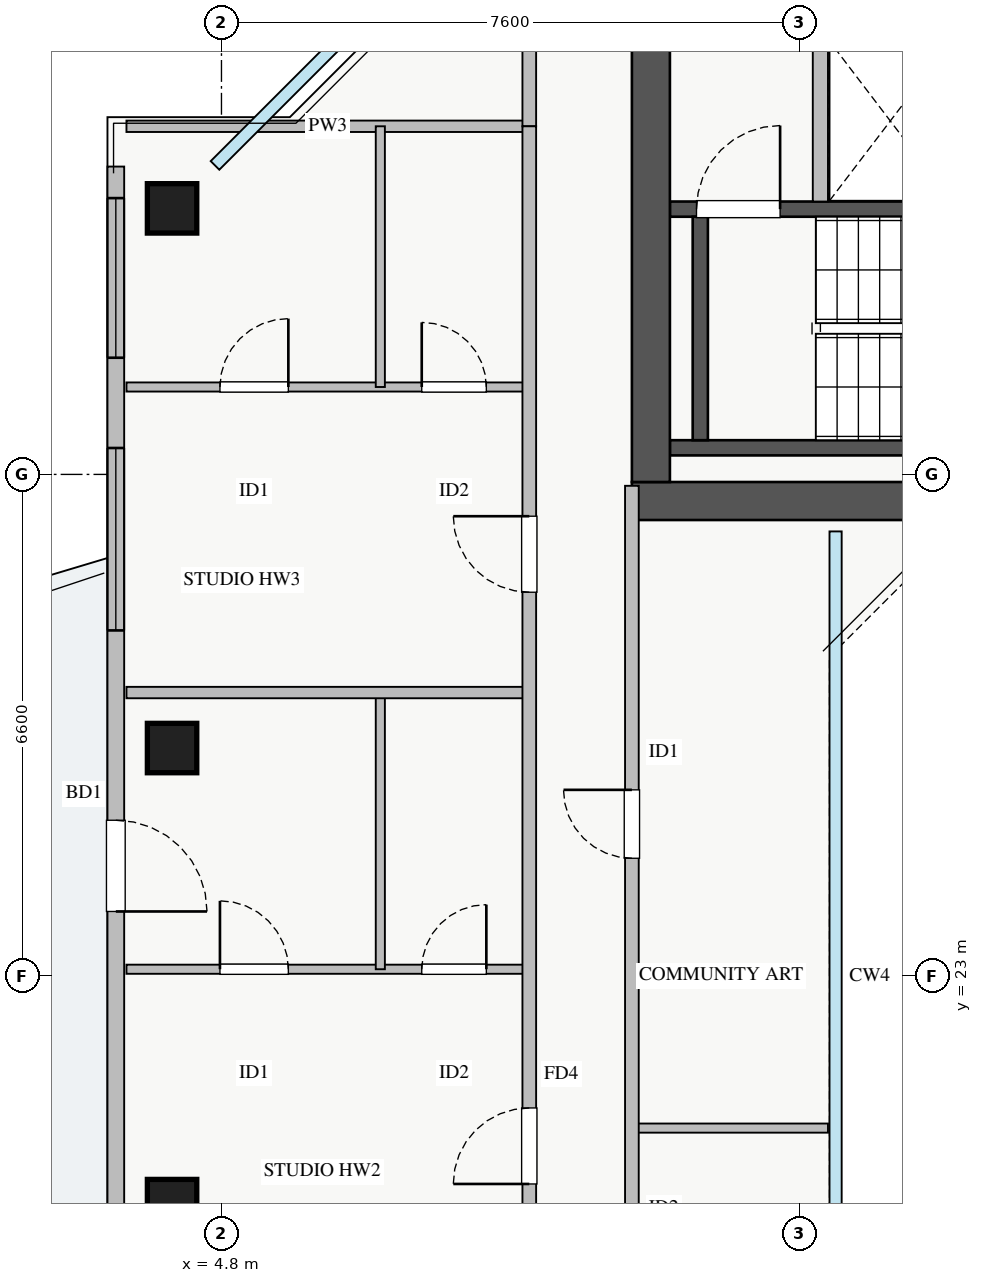
"""IFC4 building model, lengths in metres.
Left out: names, types, materials, properties, quantities, classifications, styles, units other than length and angle.
Written with IfcOpenShell. Run it as: python <this file> out.ifc"""

import sys

from ifc_helpers import new_model, si_unit, direction, frame, frame_2d, origin, origin_2d, place, context, subcontext, project, spatial, rectangle, extrude, source, transform, mapped, element, fill, save


model = new_model("IFC4")
c1 = context("Model", 3, precision=1e-05, world=origin(), true_north=direction((0.0, 1.0)))
c2 = subcontext(c1, "Body", "Model", "MODEL_VIEW")
j1 = project(units=[si_unit("LENGTHUNIT", "METRE"), si_unit("PLANEANGLEUNIT", "RADIAN")], contexts=[c1])
p1 = place(None, origin())
s1 = spatial("IfcSite", under=j1, at=p1, CompositionType="ELEMENT")
p2 = place(p1, origin())
s2 = spatial("IfcBuilding", under=s1, at=p2, CompositionType="ELEMENT")
p3 = place(p2, frame((0.0, 0.0, 260.0)))
s3 = spatial("IfcBuildingStorey", under=s2, at=p3, CompositionType="ELEMENT", Elevation=260.0)
p4 = place(p3, frame((12.68, 33.2, 0.0), z_axis=(0.0, 0.0, 1.0), x_axis=(1.0, 0.0, 0.0)))
e1 = element("IfcWall", 1, at=p4, inside=s3, PredefinedType="SHEAR", context=c2, shape_type="SweptSolid", body=[
    extrude(rectangle(XDim=1.94, YDim=0.18, at=frame_2d((0.97, 0.0))), origin(), (0.0, 0.0, 1.0), 3.03),
])
p5 = place(p3, frame((10.7, 29.95, 0.0), z_axis=(0.0, 0.0, 1.0), x_axis=(1.0, 0.0, 0.0)))
e2 = element("IfcWall", 2, at=p5, inside=s3, PredefinedType="SHEAR", context=c2, shape_type="SweptSolid", body=[
    extrude(rectangle(XDim=7.45, YDim=0.2, at=frame_2d((3.725, 0.0))), origin(), (0.0, 0.0, 1.0), 3.25),
])
p6 = place(p3, frame((10.7, 33.09, 0.0), z_axis=(0.0, 0.0, 1.0), x_axis=(1.0, 0.0, 0.0)))
e3 = element("IfcWall", 3, at=p6, inside=s3, PredefinedType="SHEAR", context=c2, shape_type="SweptSolid", body=[
    extrude(rectangle(XDim=7.45, YDim=0.2, at=frame_2d((3.725, 0.0))), origin(), (0.0, 0.0, 1.0), 3.25),
])
p7 = place(p6, frame((0.35, 0.0, 0.0)))
e4 = element("IfcOpeningElement", 4, at=p7, cuts=e3, PredefinedType="OPENING", context=c2, shape_type="SweptSolid", body=[
    extrude(rectangle(XDim=1.1, YDim=2.05, at=frame_2d((0.55, 1.025))), frame((0.0, 0.11, 0.0), z_axis=(0.0, -1.0, 0.0), x_axis=(1.0, 0.0, 0.0)), (0.0, 0.0, 1.0), 0.22),
])
p8 = place(p3, frame((11.1, 30.05, 0.0), z_axis=(0.0, 0.0, 1.0), x_axis=(0.0, 1.0, 0.0)))
e5 = element("IfcWall", 5, at=p8, inside=s3, PredefinedType="SHEAR", context=c2, shape_type="SweptSolid", body=[
    extrude(rectangle(XDim=2.94, YDim=0.2, at=frame_2d((1.47, 0.0))), origin(), (0.0, 0.0, 1.0), 3.25),
])
p9 = place(p3, frame((10.2, 29.25, 0.0), z_axis=(0.0, 0.0, 1.0), x_axis=(1.0, 0.0, 0.0)))
e6 = element("IfcWall", 6, at=p9, inside=s3, PredefinedType="SHEAR", context=c2, shape_type="SweptSolid", body=[
    extrude(rectangle(XDim=17.6, YDim=0.5, at=frame_2d((8.8, 0.0))), origin(), (0.0, 0.0, 1.0), 3.25),
])
p10 = place(p3, frame((10.45, 29.5, 0.0), z_axis=(0.0, 0.0, 1.0), x_axis=(0.0, 1.0, 0.0)))
e7 = element("IfcWall", 7, at=p10, inside=s3, PredefinedType="SHEAR", context=c2, shape_type="SweptSolid", body=[
    extrude(rectangle(XDim=6.2, YDim=0.5, at=frame_2d((3.1, 0.0))), origin(), (0.0, 0.0, 1.0), 3.25),
])
m1 = source(origin(), c2, "Body", "SweptSolid", [
    extrude(rectangle(XDim=0.65, YDim=0.65, at=origin_2d()), origin(), (0.0, 0.0, 1.0), 3.25),
])
for number, where, z_axis, x_axis in (
    (8, (4.15, 33.1, 0.0), (0.0, 0.0, 1.0), (1.0, 0.0, 0.0)),
    (9, (4.15, 26.0, 0.0), (0.0, 0.0, 1.0), (1.0, 0.0, 0.0)),
    (10, (4.15, 20.0, 0.0), (0.0, 0.0, 1.0), (1.0, 0.0, 0.0)),
):
    element("IfcColumn", number, at=place(p3, frame(where, z_axis=z_axis, x_axis=x_axis)), inside=s3, PredefinedType="COLUMN", context=c2, shape_type="MappedRepresentation", body=[
        mapped(m1, transform((0.0, 0.0, 0.0), x_axis=(1.0, 0.0, 0.0), y_axis=(0.0, 1.0, 0.0), z_axis=(0.0, 0.0, 1.0), scale=1.0)),
    ])
p11 = place(p3, frame((3.41, 12.35, 0.0), z_axis=(0.0, 0.0, 1.0), x_axis=(0.0, 1.0, 0.0)))
e11 = element("IfcWall", 11, at=p11, inside=s3, PredefinedType="STANDARD", context=c2, shape_type="SweptSolid", body=[
    extrude(rectangle(XDim=21.3, YDim=0.22, at=frame_2d((10.65, 0.0))), origin(), (0.0, 0.0, 1.0), 2.57),
])
p12 = place(p11, frame((11.5, 0.0, 0.0)))
e12 = element("IfcOpeningElement", 12, at=p12, cuts=e11, PredefinedType="OPENING", context=c2, shape_type="SweptSolid", body=[
    extrude(rectangle(XDim=1.2, YDim=2.1, at=frame_2d((0.6, 1.05))), frame((0.0, 0.12, 0.0), z_axis=(0.0, -1.0, 0.0), x_axis=(1.0, 0.0, 0.0)), (0.0, 0.0, 1.0), 0.24),
])
p13 = place(p11, frame((0.44, 0.0, 0.9)))
e13 = element("IfcOpeningElement", 13, at=p13, cuts=e11, PredefinedType="OPENING", context=c2, shape_type="SweptSolid", body=[
    extrude(rectangle(XDim=2.4, YDim=1.5, at=frame_2d((1.2, 0.75))), frame((0.0, 0.12, 0.0), z_axis=(0.0, -1.0, 0.0), x_axis=(1.0, 0.0, 0.0)), (0.0, 0.0, 1.0), 0.24),
])
p14 = place(p11, frame((18.785, 0.0, 0.9)))
e14 = element("IfcOpeningElement", 14, at=p14, cuts=e11, PredefinedType="OPENING", context=c2, shape_type="SweptSolid", body=[
    extrude(rectangle(XDim=2.1, YDim=1.5, at=frame_2d((1.05, 0.75))), frame((0.0, 0.12, 0.0), z_axis=(0.0, -1.0, 0.0), x_axis=(1.0, 0.0, 0.0)), (0.0, 0.0, 1.0), 0.24),
])
p15 = place(p11, frame((3.653, 0.0, 0.9)))
e15 = element("IfcOpeningElement", 15, at=p15, cuts=e11, PredefinedType="OPENING", context=c2, shape_type="SweptSolid", body=[
    extrude(rectangle(XDim=2.4, YDim=1.5, at=frame_2d((1.2, 0.75))), frame((0.0, 0.12, 0.0), z_axis=(0.0, -1.0, 0.0), x_axis=(1.0, 0.0, 0.0)), (0.0, 0.0, 1.0), 0.24),
])
p16 = place(p11, frame((15.198, 0.0, 0.9)))
e16 = element("IfcOpeningElement", 16, at=p16, cuts=e11, PredefinedType="OPENING", context=c2, shape_type="SweptSolid", body=[
    extrude(rectangle(XDim=2.4, YDim=1.5, at=frame_2d((1.2, 0.75))), frame((0.0, 0.12, 0.0), z_axis=(0.0, -1.0, 0.0), x_axis=(1.0, 0.0, 0.0)), (0.0, 0.0, 1.0), 0.24),
])
p17 = place(p11, frame((6.705, 0.0, 0.9)))
e17 = element("IfcOpeningElement", 17, at=p17, cuts=e11, PredefinedType="OPENING", context=c2, shape_type="SweptSolid", body=[
    extrude(rectangle(XDim=0.9, YDim=1.2, at=frame_2d((0.45, 0.6))), frame((0.0, 0.12, 0.0), z_axis=(0.0, -1.0, 0.0), x_axis=(1.0, 0.0, 0.0)), (0.0, 0.0, 1.0), 0.24),
])
p18 = place(p3, frame((12.68, 33.19, 0.0), z_axis=(0.0, 0.0, 1.0), x_axis=(0.0, 1.0, 0.0)))
e18 = element("IfcWall", 18, at=p18, inside=s3, PredefinedType="PARTITIONING", context=c2, shape_type="SweptSolid", body=[
    extrude(rectangle(XDim=2.21, YDim=0.2, at=frame_2d((1.105, 0.0))), origin(), (0.0, 0.0, 1.0), 3.03),
])
p19 = place(p3, frame((3.55, 34.18, 0.0), z_axis=(0.0, 0.0, 1.0), x_axis=(1.0, 0.0, 0.0)))
e19 = element("IfcWall", 19, at=p19, inside=s3, PredefinedType="PARTITIONING", context=c2, shape_type="SweptSolid", body=[
    extrude(rectangle(XDim=5.3, YDim=0.15, at=frame_2d((2.65, 0.0))), origin(), (0.0, 0.0, 1.0), 3.03),
])
p20 = place(p3, frame((8.85, 34.18, 0.0), z_axis=(0.0, 0.0, 1.0), x_axis=(0.0, 1.0, 0.0)))
e20 = element("IfcWall", 20, at=p20, inside=s3, PredefinedType="PARTITIONING", context=c2, shape_type="SweptSolid", body=[
    extrude(rectangle(XDim=3.26, YDim=0.18, at=frame_2d((1.63, 0.0))), origin(), (0.0, 0.0, 1.0), 2.529),
])
p21 = place(p3, frame((3.55, 23.09, 0.0), z_axis=(0.0, 0.0, 1.0), x_axis=(1.0, 0.0, 0.0)))
e21 = element("IfcWall", 21, at=p21, inside=s3, PredefinedType="PLUMBINGWALL", context=c2, shape_type="SweptSolid", body=[
    extrude(rectangle(XDim=5.3, YDim=0.12, at=frame_2d((2.65, 0.0))), origin(), (0.0, 0.0, 1.0), 3.03),
])
p22 = place(p21, frame((1.23, 0.0, 0.0)))
e22 = element("IfcOpeningElement", 22, at=p22, cuts=e21, PredefinedType="OPENING", context=c2, shape_type="SweptSolid", body=[
    extrude(rectangle(XDim=0.9, YDim=2.05, at=frame_2d((0.45, 1.025))), frame((0.0, 0.07, 0.0), z_axis=(0.0, -1.0, 0.0), x_axis=(1.0, 0.0, 0.0)), (0.0, 0.0, 1.0), 0.14),
])
p23 = place(p21, frame((3.885, 0.0, 0.0)))
e23 = element("IfcOpeningElement", 23, at=p23, cuts=e21, PredefinedType="OPENING", context=c2, shape_type="SweptSolid", body=[
    extrude(rectangle(XDim=0.85, YDim=2.05, at=frame_2d((0.425, 1.025))), frame((0.0, 0.07, 0.0), z_axis=(0.0, -1.0, 0.0), x_axis=(1.0, 0.0, 0.0)), (0.0, 0.0, 1.0), 0.14),
])
p24 = place(p3, frame((6.89, 23.09, 0.0), z_axis=(0.0, 0.0, 1.0), x_axis=(0.0, 1.0, 0.0)))
e24 = element("IfcWall", 24, at=p24, inside=s3, PredefinedType="PLUMBINGWALL", context=c2, shape_type="SweptSolid", body=[
    extrude(rectangle(XDim=3.64, YDim=0.12, at=frame_2d((1.82, 0.0))), origin(), (0.0, 0.0, 1.0), 3.03),
])
p25 = place(p3, frame((3.55, 30.75, 0.0), z_axis=(0.0, 0.0, 1.0), x_axis=(1.0, 0.0, 0.0)))
e25 = element("IfcWall", 25, at=p25, inside=s3, PredefinedType="PLUMBINGWALL", context=c2, shape_type="SweptSolid", body=[
    extrude(rectangle(XDim=5.3, YDim=0.12, at=frame_2d((2.65, 0.0))), origin(), (0.0, 0.0, 1.0), 3.03),
])
p26 = place(p25, frame((1.23, 0.0, 0.0)))
e26 = element("IfcOpeningElement", 26, at=p26, cuts=e25, PredefinedType="OPENING", context=c2, shape_type="SweptSolid", body=[
    extrude(rectangle(XDim=0.9, YDim=2.05, at=frame_2d((0.45, 1.025))), frame((0.0, 0.07, 0.0), z_axis=(0.0, -1.0, 0.0), x_axis=(1.0, 0.0, 0.0)), (0.0, 0.0, 1.0), 0.14),
])
p27 = place(p25, frame((3.885, 0.0, 0.0)))
e27 = element("IfcOpeningElement", 27, at=p27, cuts=e25, PredefinedType="OPENING", context=c2, shape_type="SweptSolid", body=[
    extrude(rectangle(XDim=0.85, YDim=2.05, at=frame_2d((0.425, 1.025))), frame((0.0, 0.07, 0.0), z_axis=(0.0, -1.0, 0.0), x_axis=(1.0, 0.0, 0.0)), (0.0, 0.0, 1.0), 0.14),
])
p28 = place(p3, frame((6.89, 30.75, 0.0), z_axis=(0.0, 0.0, 1.0), x_axis=(0.0, 1.0, 0.0)))
e28 = element("IfcWall", 28, at=p28, inside=s3, PredefinedType="PLUMBINGWALL", context=c2, shape_type="SweptSolid", body=[
    extrude(rectangle(XDim=3.43, YDim=0.12, at=frame_2d((1.715, 0.0))), origin(), (0.0, 0.0, 1.0), 3.03),
])
p29 = place(p3, frame((3.55, 26.73, 0.0), z_axis=(0.0, 0.0, 1.0), x_axis=(1.0, 0.0, 0.0)))
e29 = element("IfcWall", 29, at=p29, inside=s3, PredefinedType="PARTITIONING", context=c2, shape_type="SweptSolid", body=[
    extrude(rectangle(XDim=5.3, YDim=0.15, at=frame_2d((2.65, 0.0))), origin(), (0.0, 0.0, 1.0), 3.03),
])
p30 = place(p3, frame((8.85, 11.82, 0.0), z_axis=(0.0, 0.0, 1.0), x_axis=(0.0, 1.0, 0.0)))
e30 = element("IfcWall", 30, at=p30, inside=s3, PredefinedType="PARTITIONING", context=c2, shape_type="SweptSolid", body=[
    extrude(rectangle(XDim=22.36, YDim=0.18, at=frame_2d((11.18, 0.0))), origin(), (0.0, 0.0, 1.0), 2.529),
])
p31 = place(p30, frame((1.2, 0.0, 0.0)))
e31 = element("IfcOpeningElement", 31, at=p31, cuts=e30, PredefinedType="OPENING", context=c2, shape_type="SweptSolid", body=[
    extrude(rectangle(XDim=1.0, YDim=2.05, at=frame_2d((0.5, 1.025))), frame((0.0, 0.1, 0.0), z_axis=(0.0, -1.0, 0.0), x_axis=(1.0, 0.0, 0.0)), (0.0, 0.0, 1.0), 0.2),
])
p32 = place(p30, frame((8.445, 0.0, 0.0)))
e32 = element("IfcOpeningElement", 32, at=p32, cuts=e30, PredefinedType="OPENING", context=c2, shape_type="SweptSolid", body=[
    extrude(rectangle(XDim=1.0, YDim=2.05, at=frame_2d((0.5, 1.025))), frame((0.0, 0.1, 0.0), z_axis=(0.0, -1.0, 0.0), x_axis=(1.0, 0.0, 0.0)), (0.0, 0.0, 1.0), 0.2),
])
p33 = place(p30, frame((16.23, 0.0, 0.0)))
e33 = element("IfcOpeningElement", 33, at=p33, cuts=e30, PredefinedType="OPENING", context=c2, shape_type="SweptSolid", body=[
    extrude(rectangle(XDim=1.0, YDim=2.05, at=frame_2d((0.5, 1.025))), frame((0.0, 0.1, 0.0), z_axis=(0.0, -1.0, 0.0), x_axis=(1.0, 0.0, 0.0)), (0.0, 0.0, 1.0), 0.2),
])
p34 = place(p3, frame((10.2, 21.0, 0.0), z_axis=(0.0, 0.0, 1.0), x_axis=(1.0, 0.0, 0.0)))
e34 = element("IfcWall", 34, at=p34, inside=s3, PredefinedType="PLUMBINGWALL", context=c2, shape_type="SweptSolid", body=[
    extrude(rectangle(XDim=2.58, YDim=0.12, at=frame_2d((1.29, 0.0))), origin(), (0.0, 0.0, 1.0), 3.03),
])
p35 = place(p3, frame((10.2, 16.55, 0.0), z_axis=(0.0, 0.0, 1.0), x_axis=(0.0, 1.0, 0.0)))
e35 = element("IfcWall", 35, at=p35, inside=s3, PredefinedType="PARTITIONING", context=c2, shape_type="SweptSolid", body=[
    extrude(rectangle(XDim=12.9, YDim=0.18, at=frame_2d((6.45, 0.0))), origin(), (0.0, 0.0, 1.0), 3.03),
])
p36 = place(p35, frame((2.025, 0.0, 0.0)))
e36 = element("IfcOpeningElement", 36, at=p36, cuts=e35, PredefinedType="OPENING", context=c2, shape_type="SweptSolid", body=[
    extrude(rectangle(XDim=0.85, YDim=2.05, at=frame_2d((0.425, 1.025))), frame((0.0, 0.1, 0.0), z_axis=(0.0, -1.0, 0.0), x_axis=(1.0, 0.0, 0.0)), (0.0, 0.0, 1.0), 0.2),
])
p37 = place(p35, frame((8.0, 0.0, 0.0)))
e37 = element("IfcOpeningElement", 37, at=p37, cuts=e35, PredefinedType="OPENING", context=c2, shape_type="SweptSolid", body=[
    extrude(rectangle(XDim=0.9, YDim=2.05, at=frame_2d((0.45, 1.025))), frame((0.0, 0.1, 0.0), z_axis=(0.0, -1.0, 0.0), x_axis=(1.0, 0.0, 0.0)), (0.0, 0.0, 1.0), 0.2),
])
m2 = source(origin(), c2, "Body", "SweptSolid", [
    extrude(rectangle(XDim=1.2, YDim=2.1, at=frame_2d((0.6, 1.05))), frame((0.0, 0.025, 0.0), z_axis=(0.0, -1.0, 0.0), x_axis=(1.0, 0.0, 0.0)), (0.0, 0.0, 1.0), 0.05),
])
p38 = place(p12, frame((1.2, 0.0, 0.0), z_axis=(0.0, 0.0, 1.0), x_axis=(-1.0, 0.0, 0.0)))
e38 = element("IfcDoor", 38, at=p38, inside=s3, OperationType="SINGLE_SWING_LEFT", PredefinedType="DOOR", context=c2, shape_type="MappedRepresentation", body=[
    mapped(m2, transform((0.0, 0.0, 0.0), x_axis=(1.0, 0.0, 0.0), y_axis=(0.0, 1.0, 0.0), z_axis=(0.0, 0.0, 1.0), scale=1.0)),
])
fill(e12, e38)
m3 = source(origin(), c2, "Body", "SweptSolid", [
    extrude(rectangle(XDim=2.1, YDim=1.5, at=frame_2d((1.05, 0.75))), frame((0.0, 0.03, 0.0), z_axis=(0.0, -1.0, 0.0), x_axis=(1.0, 0.0, 0.0)), (0.0, 0.0, 1.0), 0.06),
])
p39 = place(p14, origin())
e39 = element("IfcWindow", 39, at=p39, inside=s3, PartitioningType="TRIPLE_PANEL_VERTICAL", PredefinedType="WINDOW", context=c2, shape_type="MappedRepresentation", body=[
    mapped(m3, transform((0.0, 0.0, 0.0), x_axis=(1.0, 0.0, 0.0), y_axis=(0.0, 1.0, 0.0), z_axis=(0.0, 0.0, 1.0), scale=1.0)),
])
fill(e14, e39)
m4 = source(origin(), c2, "Body", "SweptSolid", [
    extrude(rectangle(XDim=1.1, YDim=2.05, at=frame_2d((0.55, 1.025))), frame((0.0, 0.025, 0.0), z_axis=(0.0, -1.0, 0.0), x_axis=(1.0, 0.0, 0.0)), (0.0, 0.0, 1.0), 0.05),
])
p40 = place(p7, origin())
e40 = element("IfcDoor", 40, at=p40, inside=s3, OperationType="SINGLE_SWING_RIGHT", PredefinedType="DOOR", context=c2, shape_type="MappedRepresentation", body=[
    mapped(m4, transform((0.0, 0.0, 0.0), x_axis=(1.0, 0.0, 0.0), y_axis=(0.0, 1.0, 0.0), z_axis=(0.0, 0.0, 1.0), scale=1.0)),
])
fill(e4, e40)
m5 = source(origin(), c2, "Body", "SweptSolid", [
    extrude(rectangle(XDim=0.9, YDim=2.05, at=frame_2d((0.45, 1.025))), frame((0.0, 0.025, 0.0), z_axis=(0.0, -1.0, 0.0), x_axis=(1.0, 0.0, 0.0)), (0.0, 0.0, 1.0), 0.05),
])
p41 = place(p22, origin())
e41 = element("IfcDoor", 41, at=p41, inside=s3, OperationType="SINGLE_SWING_LEFT", PredefinedType="DOOR", context=c2, shape_type="MappedRepresentation", body=[
    mapped(m5, transform((0.0, 0.0, 0.0), x_axis=(1.0, 0.0, 0.0), y_axis=(0.0, 1.0, 0.0), z_axis=(0.0, 0.0, 1.0), scale=1.0)),
])
fill(e22, e41)
m6 = source(origin(), c2, "Body", "SweptSolid", [
    extrude(rectangle(XDim=0.85, YDim=2.05, at=frame_2d((0.425, 1.025))), frame((0.0, 0.025, 0.0), z_axis=(0.0, -1.0, 0.0), x_axis=(1.0, 0.0, 0.0)), (0.0, 0.0, 1.0), 0.05),
])
p42 = place(p23, origin())
e42 = element("IfcDoor", 42, at=p42, inside=s3, OperationType="SINGLE_SWING_RIGHT", PredefinedType="DOOR", context=c2, shape_type="MappedRepresentation", body=[
    mapped(m6, transform((0.0, 0.0, 0.0), x_axis=(1.0, 0.0, 0.0), y_axis=(0.0, 1.0, 0.0), z_axis=(0.0, 0.0, 1.0), scale=1.0)),
])
fill(e23, e42)
p43 = place(p26, origin())
e43 = element("IfcDoor", 43, at=p43, inside=s3, OperationType="SINGLE_SWING_RIGHT", PredefinedType="DOOR", context=c2, shape_type="MappedRepresentation", body=[
    mapped(m5, transform((0.0, 0.0, 0.0), x_axis=(1.0, 0.0, 0.0), y_axis=(0.0, 1.0, 0.0), z_axis=(0.0, 0.0, 1.0), scale=1.0)),
])
fill(e26, e43)
p44 = place(p27, origin())
e44 = element("IfcDoor", 44, at=p44, inside=s3, OperationType="SINGLE_SWING_LEFT", PredefinedType="DOOR", context=c2, shape_type="MappedRepresentation", body=[
    mapped(m6, transform((0.0, 0.0, 0.0), x_axis=(1.0, 0.0, 0.0), y_axis=(0.0, 1.0, 0.0), z_axis=(0.0, 0.0, 1.0), scale=1.0)),
])
fill(e27, e44)
m7 = source(origin(), c2, "Body", "SweptSolid", [
    extrude(rectangle(XDim=1.0, YDim=2.05, at=frame_2d((0.5, 1.025))), frame((0.0, 0.025, 0.0), z_axis=(0.0, -1.0, 0.0), x_axis=(1.0, 0.0, 0.0)), (0.0, 0.0, 1.0), 0.05),
])
p45 = place(p32, origin())
e45 = element("IfcDoor", 45, at=p45, inside=s3, OperationType="SINGLE_SWING_LEFT", PredefinedType="DOOR", context=c2, shape_type="MappedRepresentation", body=[
    mapped(m7, transform((0.0, 0.0, 0.0), x_axis=(1.0, 0.0, 0.0), y_axis=(0.0, 1.0, 0.0), z_axis=(0.0, 0.0, 1.0), scale=1.0)),
])
fill(e32, e45)
p46 = place(p33, origin())
e46 = element("IfcDoor", 46, at=p46, inside=s3, OperationType="SINGLE_SWING_RIGHT", PredefinedType="DOOR", context=c2, shape_type="MappedRepresentation", body=[
    mapped(m7, transform((0.0, 0.0, 0.0), x_axis=(1.0, 0.0, 0.0), y_axis=(0.0, 1.0, 0.0), z_axis=(0.0, 0.0, 1.0), scale=1.0)),
])
fill(e33, e46)
p47 = place(p37, origin())
e47 = element("IfcDoor", 47, at=p47, inside=s3, OperationType="SINGLE_SWING_RIGHT", PredefinedType="DOOR", context=c2, shape_type="MappedRepresentation", body=[
    mapped(m5, transform((0.0, 0.0, 0.0), x_axis=(1.0, 0.0, 0.0), y_axis=(0.0, 1.0, 0.0), z_axis=(0.0, 0.0, 1.0), scale=1.0)),
])
fill(e37, e47)
m8 = source(origin(), c2, "Body", "SweptSolid", [
    extrude(rectangle(XDim=2.4, YDim=1.5, at=frame_2d((1.2, 0.75))), frame((0.0, 0.03, 0.0), z_axis=(0.0, -1.0, 0.0), x_axis=(1.0, 0.0, 0.0)), (0.0, 0.0, 1.0), 0.06),
])
p48 = place(p16, origin())
e48 = element("IfcWindow", 48, at=p48, inside=s3, PartitioningType="TRIPLE_PANEL_VERTICAL", PredefinedType="WINDOW", context=c2, shape_type="MappedRepresentation", body=[
    mapped(m8, transform((0.0, 0.0, 0.0), x_axis=(1.0, 0.0, 0.0), y_axis=(0.0, 1.0, 0.0), z_axis=(0.0, 0.0, 1.0), scale=1.0)),
])
fill(e16, e48)
save(model, sys.argv[1])
